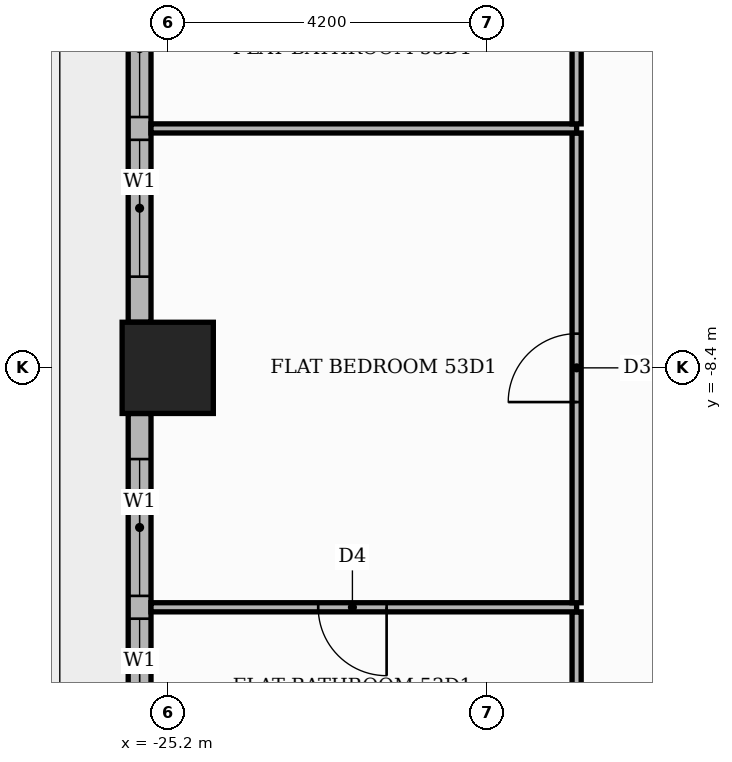
"""IFC4 building model, lengths in metres.
Left out: names, types, materials, properties, quantities, classifications, styles, units other than length and angle.
Written with IfcOpenShell. Run it as: python <this file> out.ifc"""

import sys

from ifc_helpers import new_model, si_unit, direction, frame, frame_2d, origin, origin_2d, place, context, subcontext, project, spatial, rectangle, extrude, element, fill, save


model = new_model("IFC4")
c1 = context("Model", 3, precision=1e-05, world=origin(), true_north=direction((0.0, 1.0)))
c2 = subcontext(c1, "Body", "Model", "MODEL_VIEW")
j1 = project(units=[si_unit("LENGTHUNIT", "METRE"), si_unit("PLANEANGLEUNIT", "RADIAN")], contexts=[c1])
p1 = place(None, origin())
s1 = spatial("IfcSite", under=j1, at=p1, CompositionType="ELEMENT")
p2 = place(p1, origin())
s2 = spatial("IfcBuilding", under=s1, at=p2, CompositionType="ELEMENT")
p3 = place(p2, frame((0.0, 0.0, 223.5)))
s3 = spatial("IfcBuildingStorey", under=s2, at=p3, CompositionType="ELEMENT", Elevation=223.5)
p4 = place(p3, frame((-25.2, -8.4, 0.0), z_axis=(0.0, 0.0, 1.0), x_axis=(1.0, 0.0, 0.0)))
e1 = element("IfcColumn", 1, at=p4, inside=s3, PredefinedType="COLUMN", context=c2, shape_type="SweptSolid", body=[
    extrude(rectangle(XDim=1.2, YDim=1.2, at=origin_2d()), origin(), (0.0, 0.0, 1.0), 3.9),
])
p5 = place(p3, frame((-25.57, -0.6, 0.0), z_axis=(0.0, 0.0, 1.0), x_axis=(0.0, -1.0, 0.0)))
e2 = element("IfcWall", 2, at=p5, inside=s3, PredefinedType="STANDARD", context=c2, shape_type="SweptSolid", body=[
    extrude(rectangle(XDim=7.2, YDim=0.3, at=frame_2d((3.6, 0.0))), origin(), (0.0, 0.0, 1.0), 3.48),
])
p6 = place(p5, frame((0.6, 0.0, 0.9)))
e3 = element("IfcOpeningElement", 3, at=p6, cuts=e2, PredefinedType="OPENING", context=c2, shape_type="SweptSolid", body=[
    extrude(rectangle(XDim=1.8, YDim=2.1, at=frame_2d((0.9, 1.05))), frame((0.0, 0.16, 0.0), z_axis=(0.0, -1.0, 0.0), x_axis=(1.0, 0.0, 0.0)), (0.0, 0.0, 1.0), 0.32),
])
p7 = place(p5, frame((2.7, 0.0, 0.9)))
e4 = element("IfcOpeningElement", 4, at=p7, cuts=e2, PredefinedType="OPENING", context=c2, shape_type="SweptSolid", body=[
    extrude(rectangle(XDim=1.8, YDim=2.1, at=frame_2d((0.9, 1.05))), frame((0.0, 0.16, 0.0), z_axis=(0.0, -1.0, 0.0), x_axis=(1.0, 0.0, 0.0)), (0.0, 0.0, 1.0), 0.32),
])
p8 = place(p5, frame((4.8, 0.0, 0.9)))
e5 = element("IfcOpeningElement", 5, at=p8, cuts=e2, PredefinedType="OPENING", context=c2, shape_type="SweptSolid", body=[
    extrude(rectangle(XDim=1.8, YDim=2.1, at=frame_2d((0.9, 1.05))), frame((0.0, 0.16, 0.0), z_axis=(0.0, -1.0, 0.0), x_axis=(1.0, 0.0, 0.0)), (0.0, 0.0, 1.0), 0.32),
])
p9 = place(p3, frame((-25.57, -9.0, 0.0), z_axis=(0.0, 0.0, 1.0), x_axis=(0.0, -1.0, 0.0)))
e6 = element("IfcWall", 6, at=p9, inside=s3, PredefinedType="STANDARD", context=c2, shape_type="SweptSolid", body=[
    extrude(rectangle(XDim=7.2, YDim=0.3, at=frame_2d((3.6, 0.0))), origin(), (0.0, 0.0, 1.0), 3.48),
])
p10 = place(p9, frame((0.6, 0.0, 0.9)))
e7 = element("IfcOpeningElement", 7, at=p10, cuts=e6, PredefinedType="OPENING", context=c2, shape_type="SweptSolid", body=[
    extrude(rectangle(XDim=1.8, YDim=2.1, at=frame_2d((0.9, 1.05))), frame((0.0, 0.16, 0.0), z_axis=(0.0, -1.0, 0.0), x_axis=(1.0, 0.0, 0.0)), (0.0, 0.0, 1.0), 0.32),
])
p11 = place(p9, frame((2.7, 0.0, 0.9)))
e8 = element("IfcOpeningElement", 8, at=p11, cuts=e6, PredefinedType="OPENING", context=c2, shape_type="SweptSolid", body=[
    extrude(rectangle(XDim=1.8, YDim=2.1, at=frame_2d((0.9, 1.05))), frame((0.0, 0.16, 0.0), z_axis=(0.0, -1.0, 0.0), x_axis=(1.0, 0.0, 0.0)), (0.0, 0.0, 1.0), 0.32),
])
p12 = place(p9, frame((4.8, 0.0, 0.9)))
e9 = element("IfcOpeningElement", 9, at=p12, cuts=e6, PredefinedType="OPENING", context=c2, shape_type="SweptSolid", body=[
    extrude(rectangle(XDim=1.8, YDim=2.1, at=frame_2d((0.9, 1.05))), frame((0.0, 0.16, 0.0), z_axis=(0.0, -1.0, 0.0), x_axis=(1.0, 0.0, 0.0)), (0.0, 0.0, 1.0), 0.32),
])
p13 = place(p3, frame((-19.82, -13.55, 0.0), z_axis=(0.0, 0.0, 1.0), x_axis=(0.0, 1.0, 0.0)))
e10 = element("IfcWall", 10, at=p13, inside=s3, PredefinedType="PARTITIONING", context=c2, shape_type="SweptSolid", body=[
    extrude(rectangle(XDim=1.94, YDim=0.12, at=frame_2d((0.97, 0.0))), origin(), (0.0, 0.0, 1.0), 3.48),
])
p14 = place(p3, frame((-25.42, -11.55, 0.0), z_axis=(0.0, 0.0, 1.0), x_axis=(1.0, 0.0, 0.0)))
e11 = element("IfcWall", 11, at=p14, inside=s3, PredefinedType="PARTITIONING", context=c2, shape_type="SweptSolid", body=[
    extrude(rectangle(XDim=5.6, YDim=0.12, at=frame_2d((2.8, 0.0))), origin(), (0.0, 0.0, 1.0), 3.48),
])
p15 = place(p14, frame((2.2, 0.0, 0.0)))
e12 = element("IfcOpeningElement", 12, at=p15, cuts=e11, PredefinedType="OPENING", context=c2, shape_type="SweptSolid", body=[
    extrude(rectangle(XDim=0.9, YDim=2.1, at=frame_2d((0.45, 1.05))), frame((0.0, 0.07, 0.0), z_axis=(0.0, -1.0, 0.0), x_axis=(1.0, 0.0, 0.0)), (0.0, 0.0, 1.0), 0.14),
])
p16 = place(p3, frame((-19.82, -11.49, 0.0), z_axis=(0.0, 0.0, 1.0), x_axis=(0.0, 1.0, 0.0)))
e13 = element("IfcWall", 13, at=p16, inside=s3, PredefinedType="PARTITIONING", context=c2, shape_type="SweptSolid", body=[
    extrude(rectangle(XDim=6.18, YDim=0.12, at=frame_2d((3.09, 0.0))), origin(), (0.0, 0.0, 1.0), 3.48),
])
p17 = place(p16, frame((2.64, 0.0, 0.0)))
e14 = element("IfcOpeningElement", 14, at=p17, cuts=e13, PredefinedType="OPENING", context=c2, shape_type="SweptSolid", body=[
    extrude(rectangle(XDim=0.9, YDim=2.1, at=frame_2d((0.45, 1.05))), frame((0.0, 0.07, 0.0), z_axis=(0.0, -1.0, 0.0), x_axis=(1.0, 0.0, 0.0)), (0.0, 0.0, 1.0), 0.14),
])
p18 = place(p3, frame((-25.42, -5.25, 0.0), z_axis=(0.0, 0.0, 1.0), x_axis=(1.0, 0.0, 0.0)))
e15 = element("IfcWall", 15, at=p18, inside=s3, PredefinedType="PARTITIONING", context=c2, shape_type="SweptSolid", body=[
    extrude(rectangle(XDim=5.6, YDim=0.12, at=frame_2d((2.8, 0.0))), origin(), (0.0, 0.0, 1.0), 3.48),
])
p19 = place(p3, frame((-19.82, -5.19, 0.0), z_axis=(0.0, 0.0, 1.0), x_axis=(0.0, 1.0, 0.0)))
e16 = element("IfcWall", 16, at=p19, inside=s3, PredefinedType="PARTITIONING", context=c2, shape_type="SweptSolid", body=[
    extrude(rectangle(XDim=1.98, YDim=0.12, at=frame_2d((0.99, 0.0))), origin(), (0.0, 0.0, 1.0), 3.48),
])
p20 = place(p7, origin())
e17 = element("IfcWindow", 17, at=p20, inside=s3, PartitioningType="SINGLE_PANEL", PredefinedType="WINDOW", context=c2, shape_type="SweptSolid", body=[
    extrude(rectangle(XDim=1.8, YDim=2.1, at=frame_2d((0.9, 1.05))), frame((0.0, 0.03, 0.0), z_axis=(0.0, -1.0, 0.0), x_axis=(1.0, 0.0, 0.0)), (0.0, 0.0, 1.0), 0.06),
])
fill(e4, e17)
p21 = place(p8, origin())
e18 = element("IfcWindow", 18, at=p21, inside=s3, PartitioningType="SINGLE_PANEL", PredefinedType="WINDOW", context=c2, shape_type="SweptSolid", body=[
    extrude(rectangle(XDim=1.8, YDim=2.1, at=frame_2d((0.9, 1.05))), frame((0.0, 0.03, 0.0), z_axis=(0.0, -1.0, 0.0), x_axis=(1.0, 0.0, 0.0)), (0.0, 0.0, 1.0), 0.06),
])
fill(e5, e18)
p22 = place(p10, origin())
e19 = element("IfcWindow", 19, at=p22, inside=s3, PartitioningType="SINGLE_PANEL", PredefinedType="WINDOW", context=c2, shape_type="SweptSolid", body=[
    extrude(rectangle(XDim=1.8, YDim=2.1, at=frame_2d((0.9, 1.05))), frame((0.0, 0.03, 0.0), z_axis=(0.0, -1.0, 0.0), x_axis=(1.0, 0.0, 0.0)), (0.0, 0.0, 1.0), 0.06),
])
fill(e7, e19)
p23 = place(p11, origin())
e20 = element("IfcWindow", 20, at=p23, inside=s3, PartitioningType="SINGLE_PANEL", PredefinedType="WINDOW", context=c2, shape_type="SweptSolid", body=[
    extrude(rectangle(XDim=1.8, YDim=2.1, at=frame_2d((0.9, 1.05))), frame((0.0, 0.03, 0.0), z_axis=(0.0, -1.0, 0.0), x_axis=(1.0, 0.0, 0.0)), (0.0, 0.0, 1.0), 0.06),
])
fill(e8, e20)
p24 = place(p17, origin())
e21 = element("IfcDoor", 21, at=p24, inside=s3, OperationType="SINGLE_SWING_LEFT", PredefinedType="DOOR", context=c2, shape_type="SweptSolid", body=[
    extrude(rectangle(XDim=0.9, YDim=2.1, at=frame_2d((0.45, 1.05))), frame((0.0, 0.025, 0.0), z_axis=(0.0, -1.0, 0.0), x_axis=(1.0, 0.0, 0.0)), (0.0, 0.0, 1.0), 0.05),
])
fill(e14, e21)
p25 = place(p15, frame((0.9, 0.0, 0.0), z_axis=(0.0, 0.0, 1.0), x_axis=(-1.0, 0.0, 0.0)))
e22 = element("IfcDoor", 22, at=p25, inside=s3, OperationType="SINGLE_SWING_RIGHT", PredefinedType="DOOR", context=c2, shape_type="SweptSolid", body=[
    extrude(rectangle(XDim=0.9, YDim=2.1, at=frame_2d((0.45, 1.05))), frame((0.0, 0.025, 0.0), z_axis=(0.0, -1.0, 0.0), x_axis=(1.0, 0.0, 0.0)), (0.0, 0.0, 1.0), 0.05),
])
fill(e12, e22)
save(model, sys.argv[1])
